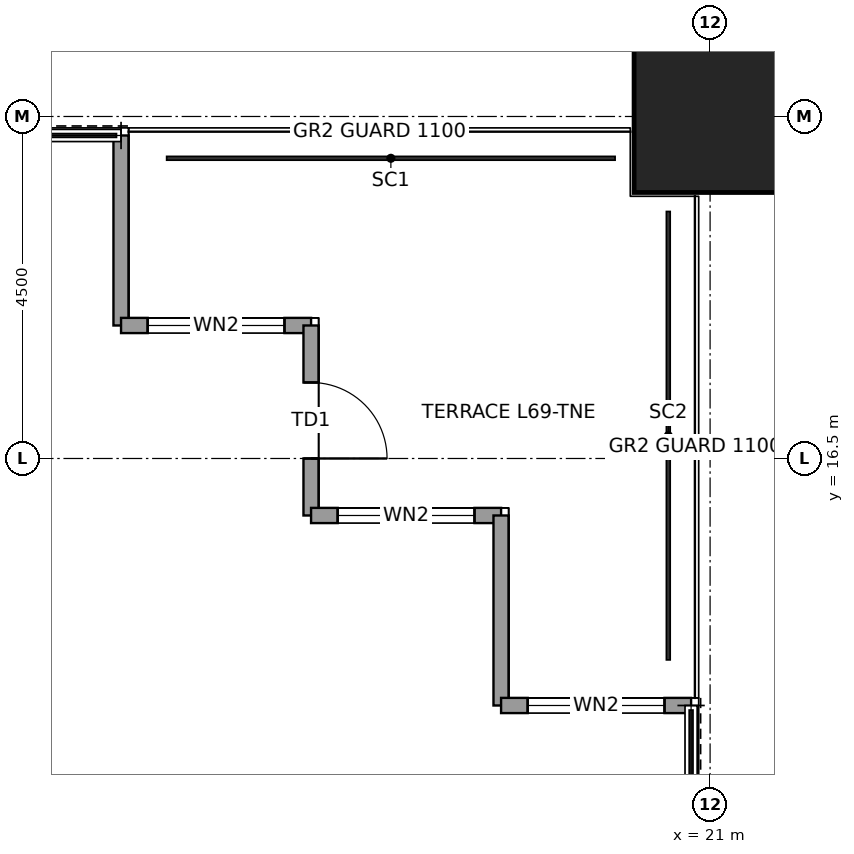
"""IFC4 building model, lengths in metres.
Left out: names, types, materials, properties, quantities, classifications, styles, units other than length and angle.
Written with IfcOpenShell. Run it as: python <this file> out.ifc"""

import sys

from ifc_helpers import new_model, si_unit, direction, frame, frame_2d, origin, origin_2d, place, context, subcontext, project, spatial, rectangle, hollow_rectangle, extrude, element, fill, save


model = new_model("IFC4")
c1 = context("Model", 3, precision=1e-05, world=origin(), true_north=direction((0.0, 1.0)))
c2 = subcontext(c1, "Body", "Model", "MODEL_VIEW")
j1 = project(units=[si_unit("LENGTHUNIT", "METRE"), si_unit("PLANEANGLEUNIT", "RADIAN")], contexts=[c1])
p1 = place(None, origin())
s1 = spatial("IfcSite", under=j1, at=p1, CompositionType="ELEMENT")
p2 = place(p1, origin())
s2 = spatial("IfcBuilding", under=s1, at=p2, CompositionType="ELEMENT")
p3 = place(p2, frame((0.0, 0.0, 311.9)))
s3 = spatial("IfcBuildingStorey", under=s2, at=p3, CompositionType="ELEMENT", Elevation=311.9)
p4 = place(p3, frame((21.0, 21.0, 0.0), z_axis=(0.0, 0.0, 1.0), x_axis=(1.0, 0.0, 0.0)))
e1 = element("IfcColumn", 1, at=p4, inside=s3, PredefinedType="COLUMN", context=c2, shape_type="SweptSolid", body=[
    extrude(hollow_rectangle(XDim=2.0, YDim=2.0, WallThickness=0.095, at=origin_2d()), origin(), (0.0, 0.0, 1.0), 4.0),
])
p5 = place(p3, frame((13.25, 20.75, 0.0), z_axis=(0.0, 0.0, 1.0), x_axis=(0.0, -1.0, 0.0)))
e2 = element("IfcWall", 2, at=p5, inside=s3, PredefinedType="SOLIDWALL", context=c2, shape_type="SweptSolid", body=[
    extrude(rectangle(XDim=2.5, YDim=0.2, at=frame_2d((1.25, 0.0))), origin(), (0.0, 0.0, 1.0), 3.85),
])
p6 = place(p3, frame((13.25, 18.25, 0.0), z_axis=(0.0, 0.0, 1.0), x_axis=(1.0, 0.0, 0.0)))
e3 = element("IfcWall", 3, at=p6, inside=s3, PredefinedType="SOLIDWALL", context=c2, shape_type="SweptSolid", body=[
    extrude(rectangle(XDim=2.5, YDim=0.2, at=frame_2d((1.25, 0.0))), origin(), (0.0, 0.0, 1.0), 3.85),
])
p7 = place(p6, frame((0.35, 0.0, 0.3)))
e4 = element("IfcOpeningElement", 4, at=p7, cuts=e3, PredefinedType="OPENING", context=c2, shape_type="SweptSolid", body=[
    extrude(rectangle(XDim=1.8, YDim=2.4, at=frame_2d((0.9, 1.2))), frame((0.0, 0.11, 0.0), z_axis=(0.0, -1.0, 0.0), x_axis=(1.0, 0.0, 0.0)), (0.0, 0.0, 1.0), 0.22),
])
p8 = place(p3, frame((15.75, 18.25, 0.0), z_axis=(0.0, 0.0, 1.0), x_axis=(0.0, -1.0, 0.0)))
e5 = element("IfcWall", 5, at=p8, inside=s3, PredefinedType="SOLIDWALL", context=c2, shape_type="SweptSolid", body=[
    extrude(rectangle(XDim=2.5, YDim=0.2, at=frame_2d((1.25, 0.0))), origin(), (0.0, 0.0, 1.0), 3.317),
])
p9 = place(p8, frame((0.75, 0.0, 0.0)))
e6 = element("IfcOpeningElement", 6, at=p9, cuts=e5, PredefinedType="OPENING", context=c2, shape_type="SweptSolid", body=[
    extrude(rectangle(XDim=1.0, YDim=2.4, at=frame_2d((0.5, 1.2))), frame((0.0, 0.11, 0.0), z_axis=(0.0, -1.0, 0.0), x_axis=(1.0, 0.0, 0.0)), (0.0, 0.0, 1.0), 0.22),
])
p10 = place(p3, frame((15.75, 15.75, 0.0), z_axis=(0.0, 0.0, 1.0), x_axis=(1.0, 0.0, 0.0)))
e7 = element("IfcWall", 7, at=p10, inside=s3, PredefinedType="SOLIDWALL", context=c2, shape_type="SweptSolid", body=[
    extrude(rectangle(XDim=2.5, YDim=0.2, at=frame_2d((1.25, 0.0))), origin(), (0.0, 0.0, 1.0), 3.85),
])
p11 = place(p10, frame((0.35, 0.0, 0.3)))
e8 = element("IfcOpeningElement", 8, at=p11, cuts=e7, PredefinedType="OPENING", context=c2, shape_type="SweptSolid", body=[
    extrude(rectangle(XDim=1.8, YDim=2.4, at=frame_2d((0.9, 1.2))), frame((0.0, 0.11, 0.0), z_axis=(0.0, -1.0, 0.0), x_axis=(1.0, 0.0, 0.0)), (0.0, 0.0, 1.0), 0.22),
])
p12 = place(p3, frame((18.25, 15.75, 0.0), z_axis=(0.0, 0.0, 1.0), x_axis=(0.0, -1.0, 0.0)))
e9 = element("IfcWall", 9, at=p12, inside=s3, PredefinedType="SOLIDWALL", context=c2, shape_type="SweptSolid", body=[
    extrude(rectangle(XDim=2.5, YDim=0.2, at=frame_2d((1.25, 0.0))), origin(), (0.0, 0.0, 1.0), 3.85),
])
p13 = place(p3, frame((18.25, 13.25, 0.0), z_axis=(0.0, 0.0, 1.0), x_axis=(1.0, 0.0, 0.0)))
e10 = element("IfcWall", 10, at=p13, inside=s3, PredefinedType="SOLIDWALL", context=c2, shape_type="SweptSolid", body=[
    extrude(rectangle(XDim=2.5, YDim=0.2, at=frame_2d((1.25, 0.0))), origin(), (0.0, 0.0, 1.0), 3.85),
])
p14 = place(p13, frame((0.35, 0.0, 0.3)))
e11 = element("IfcOpeningElement", 11, at=p14, cuts=e10, PredefinedType="OPENING", context=c2, shape_type="SweptSolid", body=[
    extrude(rectangle(XDim=1.8, YDim=2.4, at=frame_2d((0.9, 1.2))), frame((0.0, 0.11, 0.0), z_axis=(0.0, -1.0, 0.0), x_axis=(1.0, 0.0, 0.0)), (0.0, 0.0, 1.0), 0.22),
])
p15 = place(p7, origin())
e12 = element("IfcWindow", 12, at=p15, inside=s3, PartitioningType="SINGLE_PANEL", PredefinedType="WINDOW", context=c2, shape_type="SweptSolid", body=[
    extrude(rectangle(XDim=1.8, YDim=2.4, at=frame_2d((0.9, 1.2))), frame((0.0, 0.03, 0.0), z_axis=(0.0, -1.0, 0.0), x_axis=(1.0, 0.0, 0.0)), (0.0, 0.0, 1.0), 0.06),
])
fill(e4, e12)
p16 = place(p9, origin())
e13 = element("IfcDoor", 13, at=p16, inside=s3, OperationType="SINGLE_SWING_RIGHT", PredefinedType="DOOR", context=c2, shape_type="SweptSolid", body=[
    extrude(rectangle(XDim=1.0, YDim=2.4, at=frame_2d((0.5, 1.2))), frame((0.0, 0.025, 0.0), z_axis=(0.0, -1.0, 0.0), x_axis=(1.0, 0.0, 0.0)), (0.0, 0.0, 1.0), 0.05),
])
fill(e6, e13)
p17 = place(p11, origin())
e14 = element("IfcWindow", 14, at=p17, inside=s3, PartitioningType="SINGLE_PANEL", PredefinedType="WINDOW", context=c2, shape_type="SweptSolid", body=[
    extrude(rectangle(XDim=1.8, YDim=2.4, at=frame_2d((0.9, 1.2))), frame((0.0, 0.03, 0.0), z_axis=(0.0, -1.0, 0.0), x_axis=(1.0, 0.0, 0.0)), (0.0, 0.0, 1.0), 0.06),
])
fill(e8, e14)
p18 = place(p14, origin())
e15 = element("IfcWindow", 15, at=p18, inside=s3, PartitioningType="SINGLE_PANEL", PredefinedType="WINDOW", context=c2, shape_type="SweptSolid", body=[
    extrude(rectangle(XDim=1.8, YDim=2.4, at=frame_2d((0.9, 1.2))), frame((0.0, 0.03, 0.0), z_axis=(0.0, -1.0, 0.0), x_axis=(1.0, 0.0, 0.0)), (0.0, 0.0, 1.0), 0.06),
])
fill(e11, e15)
save(model, sys.argv[1])
